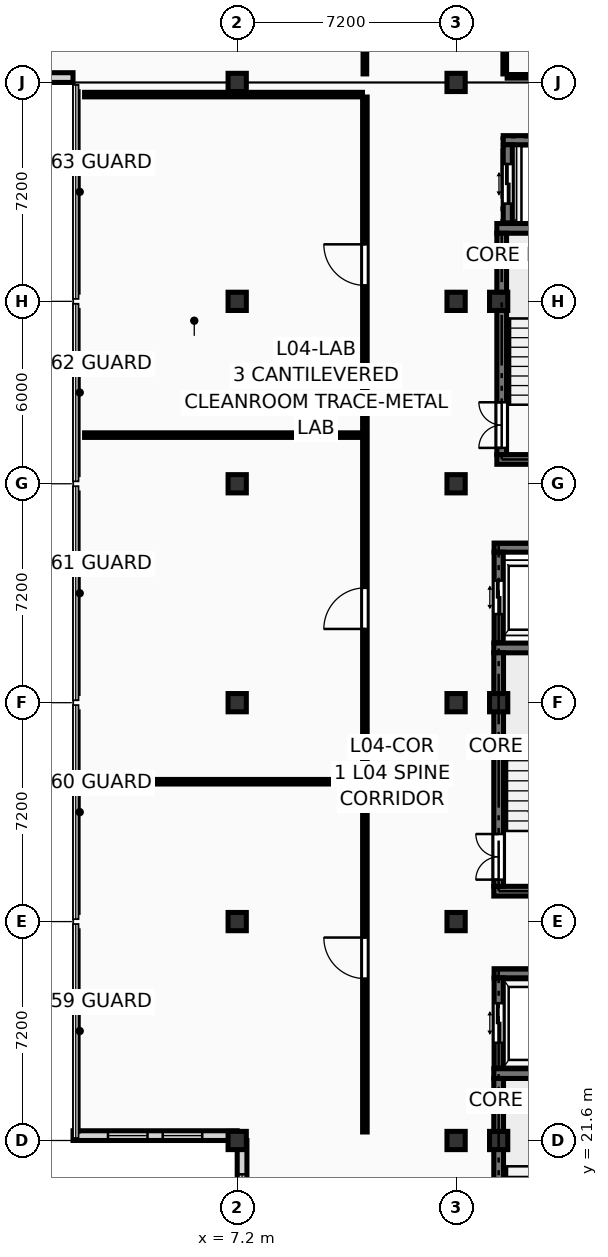
"""IFC4 building model, lengths in metres.
Left out: names, types, materials, properties, quantities, classifications, styles, units other than length and angle.
Written with IfcOpenShell. Run it as: python <this file> out.ifc"""

import sys

from ifc_helpers import new_model, si_unit, direction, frame, frame_2d, origin, origin_2d, place, context, subcontext, project, spatial, rectangle, extrude, element, fill, save


model = new_model("IFC4")
c1 = context("Model", 3, precision=1e-05, world=origin(), true_north=direction((0.0, 1.0)))
c2 = subcontext(c1, "Body", "Model", "MODEL_VIEW")
j1 = project(units=[si_unit("LENGTHUNIT", "METRE"), si_unit("PLANEANGLEUNIT", "RADIAN")], contexts=[c1])
p1 = place(None, origin())
s1 = spatial("IfcSite", under=j1, at=p1, CompositionType="ELEMENT")
p2 = place(p1, origin())
s2 = spatial("IfcBuilding", under=s1, at=p2, CompositionType="ELEMENT")
p3 = place(p2, frame((0.0, 0.0, 15.75)))
s3 = spatial("IfcBuildingStorey", under=s2, at=p3, CompositionType="ELEMENT", Elevation=15.75)
for number, where, z_axis, x_axis in (
    (1, (7.2, 21.6, 0.0), (0.0, 0.0, 1.0), (1.0, 0.0, 0.0)),
    (2, (7.2, 28.8, 0.0), (0.0, 0.0, 1.0), (1.0, 0.0, 0.0)),
    (3, (7.2, 36.0, 0.0), (0.0, 0.0, 1.0), (1.0, 0.0, 0.0)),
    (4, (7.2, 43.2, 0.0), (0.0, 0.0, 1.0), (1.0, 0.0, 0.0)),
    (5, (7.2, 49.2, 0.0), (0.0, 0.0, 1.0), (1.0, 0.0, 0.0)),
    (6, (7.2, 56.4, 0.0), (0.0, 0.0, 1.0), (1.0, 0.0, 0.0)),
    (7, (14.4, 21.6, 0.0), (0.0, 0.0, 1.0), (1.0, 0.0, 0.0)),
    (8, (14.4, 28.8, 0.0), (0.0, 0.0, 1.0), (1.0, 0.0, 0.0)),
    (9, (14.4, 36.0, 0.0), (0.0, 0.0, 1.0), (1.0, 0.0, 0.0)),
    (10, (14.4, 43.2, 0.0), (0.0, 0.0, 1.0), (1.0, 0.0, 0.0)),
    (11, (14.4, 49.2, 0.0), (0.0, 0.0, 1.0), (1.0, 0.0, 0.0)),
    (12, (14.4, 56.4, 0.0), (0.0, 0.0, 1.0), (1.0, 0.0, 0.0)),
    (13, (15.8, 21.6, 0.0), (0.0, 0.0, 1.0), (1.0, 0.0, 0.0)),
    (14, (15.8, 36.0, 0.0), (0.0, 0.0, 1.0), (1.0, 0.0, 0.0)),
    (15, (15.8, 49.2, 0.0), (0.0, 0.0, 1.0), (1.0, 0.0, 0.0)),
):
    element("IfcColumn", number, at=place(p3, frame(where, z_axis=z_axis, x_axis=x_axis)), inside=s3, PredefinedType="COLUMN", context=c2, shape_type="SweptSolid", body=[
        extrude(rectangle(XDim=0.6, YDim=0.6, at=origin_2d()), origin(), (0.0, 0.0, 1.0), 3.6),
    ])
p4 = place(p3, frame((7.36, 14.4, 0.0), z_axis=(0.0, 0.0, 1.0), x_axis=(0.0, 1.0, 0.0)))
e16 = element("IfcWall", 16, at=p4, inside=s3, PredefinedType="SOLIDWALL", context=c2, shape_type="SweptSolid", body=[
    extrude(rectangle(XDim=7.2, YDim=0.32, at=frame_2d((3.6, 0.0))), origin(), (0.0, 0.0, 1.0), 2.84),
])
p5 = place(p4, frame((1.113, 0.0, 0.18)))
e17 = element("IfcOpeningElement", 17, at=p5, cuts=e16, PredefinedType="OPENING", context=c2, shape_type="SweptSolid", body=[
    extrude(rectangle(XDim=1.35, YDim=2.45, at=frame_2d((0.675, 1.225))), frame((0.0, 0.172, 0.0), z_axis=(0.0, -1.0, 0.0), x_axis=(1.0, 0.0, 0.0)), (0.0, 0.0, 1.0), 0.344),
])
p6 = place(p4, frame((2.925, 0.0, 0.18)))
e18 = element("IfcOpeningElement", 18, at=p6, cuts=e16, PredefinedType="OPENING", context=c2, shape_type="SweptSolid", body=[
    extrude(rectangle(XDim=1.35, YDim=2.45, at=frame_2d((0.675, 1.225))), frame((0.0, 0.172, 0.0), z_axis=(0.0, -1.0, 0.0), x_axis=(1.0, 0.0, 0.0)), (0.0, 0.0, 1.0), 0.344),
])
p7 = place(p4, frame((4.738, 0.0, 0.18)))
e19 = element("IfcOpeningElement", 19, at=p7, cuts=e16, PredefinedType="OPENING", context=c2, shape_type="SweptSolid", body=[
    extrude(rectangle(XDim=1.35, YDim=2.45, at=frame_2d((0.675, 1.225))), frame((0.0, 0.172, 0.0), z_axis=(0.0, -1.0, 0.0), x_axis=(1.0, 0.0, 0.0)), (0.0, 0.0, 1.0), 0.344),
])
p8 = place(p3, frame((1.8, 21.76, 0.0), z_axis=(0.0, 0.0, 1.0), x_axis=(1.0, 0.0, 0.0)))
e20 = element("IfcWall", 20, at=p8, inside=s3, PredefinedType="SOLIDWALL", context=c2, shape_type="SweptSolid", body=[
    extrude(rectangle(XDim=5.4, YDim=0.32, at=frame_2d((2.7, 0.0))), origin(), (0.0, 0.0, 1.0), 2.696),
])
p9 = place(p8, frame((1.15, 0.0, 0.18)))
e21 = element("IfcOpeningElement", 21, at=p9, cuts=e20, PredefinedType="OPENING", context=c2, shape_type="SweptSolid", body=[
    extrude(rectangle(XDim=1.3, YDim=2.35, at=frame_2d((0.65, 1.175))), frame((0.0, 0.172, 0.0), z_axis=(0.0, -1.0, 0.0), x_axis=(1.0, 0.0, 0.0)), (0.0, 0.0, 1.0), 0.344),
])
p10 = place(p8, frame((2.95, 0.0, 0.18)))
e22 = element("IfcOpeningElement", 22, at=p10, cuts=e20, PredefinedType="OPENING", context=c2, shape_type="SweptSolid", body=[
    extrude(rectangle(XDim=1.3, YDim=2.35, at=frame_2d((0.65, 1.175))), frame((0.0, 0.172, 0.0), z_axis=(0.0, -1.0, 0.0), x_axis=(1.0, 0.0, 0.0)), (0.0, 0.0, 1.0), 0.344),
])
p11 = place(p3, frame((0.0, 56.56, 0.0), z_axis=(0.0, 0.0, 1.0), x_axis=(1.0, 0.0, 0.0)))
e23 = element("IfcWall", 23, at=p11, inside=s3, PredefinedType="SOLIDWALL", context=c2, shape_type="SweptSolid", body=[
    extrude(rectangle(XDim=1.8, YDim=0.32, at=frame_2d((0.9, 0.0))), origin(), (0.0, 0.0, 1.0), 3.38),
])
p12 = place(p3, frame((15.64, 23.8, 0.0), z_axis=(0.0, 0.0, 1.0), x_axis=(1.0, 0.0, 0.0)))
e24 = element("IfcWall", 24, at=p12, inside=s3, PredefinedType="SHEAR", context=c2, shape_type="SweptSolid", body=[
    extrude(rectangle(XDim=4.84, YDim=0.32, at=frame_2d((2.42, 0.0))), origin(), (0.0, 0.0, 1.0), 3.39),
])
p13 = place(p3, frame((15.8, 15.96, 0.0), z_axis=(0.0, 0.0, 1.0), x_axis=(0.0, 1.0, 0.0)))
e25 = element("IfcWall", 25, at=p13, inside=s3, PredefinedType="SHEAR", context=c2, shape_type="SweptSolid", body=[
    extrude(rectangle(XDim=7.68, YDim=0.32, at=frame_2d((3.84, 0.0))), origin(), (0.0, 0.0, 1.0), 3.39),
])
p14 = place(p13, frame((0.22, 0.0, 0.0)))
e26 = element("IfcOpeningElement", 26, at=p14, cuts=e25, PredefinedType="OPENING", context=c2, shape_type="SweptSolid", body=[
    extrude(rectangle(XDim=1.5, YDim=2.2, at=frame_2d((0.75, 1.1))), frame((0.0, 0.172, 0.0), z_axis=(0.0, -1.0, 0.0), x_axis=(1.0, 0.0, 0.0)), (0.0, 0.0, 1.0), 0.344),
])
for number, where, z_axis, x_axis in (
    (27, (15.64, 29.8, 0.0), (0.0, 0.0, 1.0), (1.0, 0.0, 0.0)),
    (28, (15.64, 37.8, 0.0), (0.0, 0.0, 1.0), (1.0, 0.0, 0.0)),
):
    element("IfcWall", number, at=place(p3, frame(where, z_axis=z_axis, x_axis=x_axis)), inside=s3, PredefinedType="SHEAR", context=c2, shape_type="SweptSolid", body=[
        extrude(rectangle(XDim=4.84, YDim=0.32, at=frame_2d((2.42, 0.0))), origin(), (0.0, 0.0, 1.0), 3.39),
    ])
p15 = place(p3, frame((15.8, 29.96, 0.0), z_axis=(0.0, 0.0, 1.0), x_axis=(0.0, 1.0, 0.0)))
e29 = element("IfcWall", 29, at=p15, inside=s3, PredefinedType="SHEAR", context=c2, shape_type="SweptSolid", body=[
    extrude(rectangle(XDim=7.68, YDim=0.32, at=frame_2d((3.84, 0.0))), origin(), (0.0, 0.0, 1.0), 3.39),
])
p16 = place(p15, frame((0.22, 0.0, 0.0)))
e30 = element("IfcOpeningElement", 30, at=p16, cuts=e29, PredefinedType="OPENING", context=c2, shape_type="SweptSolid", body=[
    extrude(rectangle(XDim=1.5, YDim=2.2, at=frame_2d((0.75, 1.1))), frame((0.0, 0.172, 0.0), z_axis=(0.0, -1.0, 0.0), x_axis=(1.0, 0.0, 0.0)), (0.0, 0.0, 1.0), 0.344),
])
for number, where, z_axis, x_axis in (
    (31, (15.74, 44.0, 0.0), (0.0, 0.0, 1.0), (1.0, 0.0, 0.0)),
    (32, (15.74, 51.6, 0.0), (0.0, 0.0, 1.0), (1.0, 0.0, 0.0)),
):
    element("IfcWall", number, at=place(p3, frame(where, z_axis=z_axis, x_axis=x_axis)), inside=s3, PredefinedType="SHEAR", context=c2, shape_type="SweptSolid", body=[
        extrude(rectangle(XDim=4.44, YDim=0.32, at=frame_2d((2.22, 0.0))), origin(), (0.0, 0.0, 1.0), 3.39),
    ])
p17 = place(p3, frame((15.9, 44.16, 0.0), z_axis=(0.0, 0.0, 1.0), x_axis=(0.0, 1.0, 0.0)))
e33 = element("IfcWall", 33, at=p17, inside=s3, PredefinedType="SHEAR", context=c2, shape_type="SweptSolid", body=[
    extrude(rectangle(XDim=7.28, YDim=0.32, at=frame_2d((3.64, 0.0))), origin(), (0.0, 0.0, 1.0), 3.39),
])
p18 = place(p17, frame((0.22, 0.0, 0.0)))
e34 = element("IfcOpeningElement", 34, at=p18, cuts=e33, PredefinedType="OPENING", context=c2, shape_type="SweptSolid", body=[
    extrude(rectangle(XDim=1.5, YDim=2.2, at=frame_2d((0.75, 1.1))), frame((0.0, 0.172, 0.0), z_axis=(0.0, -1.0, 0.0), x_axis=(1.0, 0.0, 0.0)), (0.0, 0.0, 1.0), 0.344),
])
p19 = place(p3, frame((15.65, 27.1, 0.0), z_axis=(0.0, 0.0, 1.0), x_axis=(1.0, 0.0, 0.0)))
e35 = element("IfcWall", 35, at=p19, inside=s3, PredefinedType="SHEAR", context=c2, shape_type="SweptSolid", body=[
    extrude(rectangle(XDim=2.56, YDim=0.3, at=frame_2d((1.28, 0.0))), origin(), (0.0, 0.0, 1.0), 3.39),
])
p20 = place(p3, frame((15.8, 23.98, 0.0), z_axis=(0.0, 0.0, 1.0), x_axis=(0.0, 1.0, 0.0)))
e36 = element("IfcWall", 36, at=p20, inside=s3, PredefinedType="SHEAR", context=c2, shape_type="SweptSolid", body=[
    extrude(rectangle(XDim=2.97, YDim=0.3, at=frame_2d((1.485, 0.0))), origin(), (0.0, 0.0, 1.0), 3.39),
])
p21 = place(p20, frame((0.835, 0.0, 0.0)))
e37 = element("IfcOpeningElement", 37, at=p21, cuts=e36, PredefinedType="OPENING", context=c2, shape_type="SweptSolid", body=[
    extrude(rectangle(XDim=1.3, YDim=2.25, at=frame_2d((0.65, 1.125))), frame((0.0, 0.162, 0.0), z_axis=(0.0, -1.0, 0.0), x_axis=(1.0, 0.0, 0.0)), (0.0, 0.0, 1.0), 0.324),
])
p22 = place(p3, frame((15.65, 41.1, 0.0), z_axis=(0.0, 0.0, 1.0), x_axis=(1.0, 0.0, 0.0)))
e38 = element("IfcWall", 38, at=p22, inside=s3, PredefinedType="SHEAR", context=c2, shape_type="SweptSolid", body=[
    extrude(rectangle(XDim=2.56, YDim=0.3, at=frame_2d((1.28, 0.0))), origin(), (0.0, 0.0, 1.0), 3.39),
])
p23 = place(p3, frame((15.8, 37.98, 0.0), z_axis=(0.0, 0.0, 1.0), x_axis=(0.0, 1.0, 0.0)))
e39 = element("IfcWall", 39, at=p23, inside=s3, PredefinedType="SHEAR", context=c2, shape_type="SweptSolid", body=[
    extrude(rectangle(XDim=2.97, YDim=0.3, at=frame_2d((1.485, 0.0))), origin(), (0.0, 0.0, 1.0), 3.39),
])
p24 = place(p23, frame((0.935, 0.0, 0.0)))
e40 = element("IfcOpeningElement", 40, at=p24, cuts=e39, PredefinedType="OPENING", context=c2, shape_type="SweptSolid", body=[
    extrude(rectangle(XDim=1.1, YDim=2.2, at=frame_2d((0.55, 1.1))), frame((0.0, 0.162, 0.0), z_axis=(0.0, -1.0, 0.0), x_axis=(1.0, 0.0, 0.0)), (0.0, 0.0, 1.0), 0.324),
])
p25 = place(p3, frame((15.95, 54.5, 0.0), z_axis=(0.0, 0.0, 1.0), x_axis=(1.0, 0.0, 0.0)))
e41 = element("IfcWall", 41, at=p25, inside=s3, PredefinedType="SHEAR", context=c2, shape_type="SweptSolid", body=[
    extrude(rectangle(XDim=3.0, YDim=0.3, at=frame_2d((1.5, 0.0))), origin(), (0.0, 0.0, 1.0), 3.39),
])
p26 = place(p3, frame((16.1, 51.78, 0.0), z_axis=(0.0, 0.0, 1.0), x_axis=(0.0, 1.0, 0.0)))
e42 = element("IfcWall", 42, at=p26, inside=s3, PredefinedType="SHEAR", context=c2, shape_type="SweptSolid", body=[
    extrude(rectangle(XDim=2.57, YDim=0.3, at=frame_2d((1.285, 0.0))), origin(), (0.0, 0.0, 1.0), 3.39),
])
p27 = place(p26, frame((0.635, 0.0, 0.0)))
e43 = element("IfcOpeningElement", 43, at=p27, cuts=e42, PredefinedType="OPENING", context=c2, shape_type="SweptSolid", body=[
    extrude(rectangle(XDim=1.3, YDim=2.25, at=frame_2d((0.65, 1.125))), frame((0.0, 0.162, 0.0), z_axis=(0.0, -1.0, 0.0), x_axis=(1.0, 0.0, 0.0)), (0.0, 0.0, 1.0), 0.324),
])
p28 = place(p3, frame((11.4, 21.88, 0.0), z_axis=(0.0, 0.0, 1.0), x_axis=(0.0, 1.0, 0.0)))
e44 = element("IfcWall", 44, at=p28, inside=s3, PredefinedType="PARTITIONING", context=c2, shape_type="SweptSolid", body=[
    extrude(rectangle(XDim=11.44, YDim=0.15, at=frame_2d((5.72, 0.0))), origin(), (0.0, 0.0, 1.0), 3.375),
])
p29 = place(p28, frame((5.045, 0.0, 0.0)))
e45 = element("IfcOpeningElement", 45, at=p29, cuts=e44, PredefinedType="OPENING", context=c2, shape_type="SweptSolid", body=[
    extrude(rectangle(XDim=1.35, YDim=2.2, at=frame_2d((0.675, 1.1))), frame((0.0, 0.087, 0.0), z_axis=(0.0, -1.0, 0.0), x_axis=(1.0, 0.0, 0.0)), (0.0, 0.0, 1.0), 0.174),
])
p30 = place(p3, frame((2.18, 33.4, 0.0), z_axis=(0.0, 0.0, 1.0), x_axis=(1.0, 0.0, 0.0)))
e46 = element("IfcWall", 46, at=p30, inside=s3, PredefinedType="PARTITIONING", context=c2, shape_type="SweptSolid", body=[
    extrude(rectangle(XDim=9.14, YDim=0.15, at=frame_2d((4.57, 0.0))), origin(), (0.0, 0.0, 1.0), 3.375),
])
p31 = place(p3, frame((11.4, 33.48, 0.0), z_axis=(0.0, 0.0, 1.0), x_axis=(0.0, 1.0, 0.0)))
e47 = element("IfcWall", 47, at=p31, inside=s3, PredefinedType="PARTITIONING", context=c2, shape_type="SweptSolid", body=[
    extrude(rectangle(XDim=11.24, YDim=0.15, at=frame_2d((5.62, 0.0))), origin(), (0.0, 0.0, 1.0), 3.375),
])
p32 = place(p31, frame((4.945, 0.0, 0.0)))
e48 = element("IfcOpeningElement", 48, at=p32, cuts=e47, PredefinedType="OPENING", context=c2, shape_type="SweptSolid", body=[
    extrude(rectangle(XDim=1.35, YDim=2.2, at=frame_2d((0.675, 1.1))), frame((0.0, 0.087, 0.0), z_axis=(0.0, -1.0, 0.0), x_axis=(1.0, 0.0, 0.0)), (0.0, 0.0, 1.0), 0.174),
])
p33 = place(p3, frame((2.18, 44.8, 0.0), z_axis=(0.0, 0.0, 1.0), x_axis=(1.0, 0.0, 0.0)))
e49 = element("IfcWall", 49, at=p33, inside=s3, PredefinedType="PARTITIONING", context=c2, shape_type="SweptSolid", body=[
    extrude(rectangle(XDim=9.14, YDim=0.15, at=frame_2d((4.57, 0.0))), origin(), (0.0, 0.0, 1.0), 3.375),
])
p34 = place(p3, frame((11.4, 44.88, 0.0), z_axis=(0.0, 0.0, 1.0), x_axis=(0.0, 1.0, 0.0)))
e50 = element("IfcWall", 50, at=p34, inside=s3, PredefinedType="PARTITIONING", context=c2, shape_type="SweptSolid", body=[
    extrude(rectangle(XDim=11.04, YDim=0.15, at=frame_2d((5.52, 0.0))), origin(), (0.0, 0.0, 1.0), 3.375),
])
p35 = place(p34, frame((4.845, 0.0, 0.0)))
e51 = element("IfcOpeningElement", 51, at=p35, cuts=e50, PredefinedType="OPENING", context=c2, shape_type="SweptSolid", body=[
    extrude(rectangle(XDim=1.35, YDim=2.2, at=frame_2d((0.675, 1.1))), frame((0.0, 0.087, 0.0), z_axis=(0.0, -1.0, 0.0), x_axis=(1.0, 0.0, 0.0)), (0.0, 0.0, 1.0), 0.174),
])
p36 = place(p3, frame((2.18, 56.0, 0.0), z_axis=(0.0, 0.0, 1.0), x_axis=(1.0, 0.0, 0.0)))
e52 = element("IfcWall", 52, at=p36, inside=s3, PredefinedType="PARTITIONING", context=c2, shape_type="SweptSolid", body=[
    extrude(rectangle(XDim=9.14, YDim=0.15, at=frame_2d((4.57, 0.0))), origin(), (0.0, 0.0, 1.0), 3.375),
])
p37 = place(p3, frame((11.4, 56.68, 0.0), z_axis=(0.0, 0.0, 1.0), x_axis=(0.0, 1.0, 0.0)))
e53 = element("IfcWall", 53, at=p37, inside=s3, PredefinedType="PARTITIONING", context=c2, shape_type="SweptSolid", body=[
    extrude(rectangle(XDim=28.44, YDim=0.12, at=frame_2d((14.22, 0.0))), origin(), (0.0, 0.0, 1.0), 3.375),
])
p38 = place(p37, frame((13.37, 0.0, 0.0)))
e54 = element("IfcOpeningElement", 54, at=p38, cuts=e53, PredefinedType="OPENING", context=c2, shape_type="SweptSolid", body=[
    extrude(rectangle(XDim=1.7, YDim=2.28, at=frame_2d((0.85, 1.14))), frame((0.0, 0.072, 0.0), z_axis=(0.0, -1.0, 0.0), x_axis=(1.0, 0.0, 0.0)), (0.0, 0.0, 1.0), 0.144),
])
p39 = place(p3, frame((16.0, 56.68, 0.0), z_axis=(0.0, 0.0, 1.0), x_axis=(0.0, 1.0, 0.0)))
e55 = element("IfcWall", 55, at=p39, inside=s3, PredefinedType="PARTITIONING", context=c2, shape_type="SweptSolid", body=[
    extrude(rectangle(XDim=15.12, YDim=0.12, at=frame_2d((7.56, 0.0))), origin(), (0.0, 0.0, 1.0), 3.375),
])
p40 = place(p39, frame((8.57, 0.0, 0.0)))
e56 = element("IfcOpeningElement", 56, at=p40, cuts=e55, PredefinedType="OPENING", context=c2, shape_type="SweptSolid", body=[
    extrude(rectangle(XDim=1.32, YDim=2.2, at=frame_2d((0.66, 1.1))), frame((0.0, 0.072, 0.0), z_axis=(0.0, -1.0, 0.0), x_axis=(1.0, 0.0, 0.0)), (0.0, 0.0, 1.0), 0.144),
])
p41 = place(p3, frame((16.08, 56.6, 0.0), z_axis=(0.0, 0.0, 1.0), x_axis=(1.0, 0.0, 0.0)))
e57 = element("IfcWall", 57, at=p41, inside=s3, PredefinedType="PARTITIONING", context=c2, shape_type="SweptSolid", body=[
    extrude(rectangle(XDim=5.04, YDim=0.12, at=frame_2d((2.52, 0.0))), origin(), (0.0, 0.0, 1.0), 2.691),
])
p42 = place(p7, origin())
e58 = element("IfcWindow", 58, at=p42, inside=s3, PartitioningType="SINGLE_PANEL", PredefinedType="WINDOW", context=c2, shape_type="SweptSolid", body=[
    extrude(rectangle(XDim=1.35, YDim=2.45, at=frame_2d((0.675, 1.225))), frame((0.0, 0.03, 0.0), z_axis=(0.0, -1.0, 0.0), x_axis=(1.0, 0.0, 0.0)), (0.0, 0.0, 1.0), 0.06),
])
fill(e19, e58)
p43 = place(p9, origin())
e59 = element("IfcWindow", 59, at=p43, inside=s3, PartitioningType="SINGLE_PANEL", PredefinedType="WINDOW", context=c2, shape_type="SweptSolid", body=[
    extrude(rectangle(XDim=1.3, YDim=2.35, at=frame_2d((0.65, 1.175))), frame((0.0, 0.03, 0.0), z_axis=(0.0, -1.0, 0.0), x_axis=(1.0, 0.0, 0.0)), (0.0, 0.0, 1.0), 0.06),
])
fill(e21, e59)
p44 = place(p10, origin())
e60 = element("IfcWindow", 60, at=p44, inside=s3, PartitioningType="SINGLE_PANEL", PredefinedType="WINDOW", context=c2, shape_type="SweptSolid", body=[
    extrude(rectangle(XDim=1.3, YDim=2.35, at=frame_2d((0.65, 1.175))), frame((0.0, 0.03, 0.0), z_axis=(0.0, -1.0, 0.0), x_axis=(1.0, 0.0, 0.0)), (0.0, 0.0, 1.0), 0.06),
])
fill(e22, e60)
p45 = place(p16, origin())
e61 = element("IfcDoor", 61, at=p45, inside=s3, OperationType="DOUBLE_DOOR_SINGLE_SWING", PredefinedType="DOOR", context=c2, shape_type="SweptSolid", body=[
    extrude(rectangle(XDim=1.5, YDim=2.2, at=frame_2d((0.75, 1.1))), frame((0.0, 0.025, 0.0), z_axis=(0.0, -1.0, 0.0), x_axis=(1.0, 0.0, 0.0)), (0.0, 0.0, 1.0), 0.05),
])
fill(e30, e61)
p46 = place(p18, origin())
e62 = element("IfcDoor", 62, at=p46, inside=s3, OperationType="DOUBLE_DOOR_SINGLE_SWING", PredefinedType="DOOR", context=c2, shape_type="SweptSolid", body=[
    extrude(rectangle(XDim=1.5, YDim=2.2, at=frame_2d((0.75, 1.1))), frame((0.0, 0.025, 0.0), z_axis=(0.0, -1.0, 0.0), x_axis=(1.0, 0.0, 0.0)), (0.0, 0.0, 1.0), 0.05),
])
fill(e34, e62)
p47 = place(p21, origin())
e63 = element("IfcDoor", 63, at=p47, inside=s3, OperationType="DOUBLE_DOOR_SLIDING", PredefinedType="DOOR", context=c2, shape_type="SweptSolid", body=[
    extrude(rectangle(XDim=1.3, YDim=2.25, at=frame_2d((0.65, 1.125))), frame((0.0, 0.025, 0.0), z_axis=(0.0, -1.0, 0.0), x_axis=(1.0, 0.0, 0.0)), (0.0, 0.0, 1.0), 0.05),
])
fill(e37, e63)
p48 = place(p24, origin())
e64 = element("IfcDoor", 64, at=p48, inside=s3, OperationType="DOUBLE_DOOR_SLIDING", PredefinedType="DOOR", context=c2, shape_type="SweptSolid", body=[
    extrude(rectangle(XDim=1.1, YDim=2.2, at=frame_2d((0.55, 1.1))), frame((0.0, 0.025, 0.0), z_axis=(0.0, -1.0, 0.0), x_axis=(1.0, 0.0, 0.0)), (0.0, 0.0, 1.0), 0.05),
])
fill(e40, e64)
p49 = place(p27, origin())
e65 = element("IfcDoor", 65, at=p49, inside=s3, OperationType="DOUBLE_DOOR_SLIDING", PredefinedType="DOOR", context=c2, shape_type="SweptSolid", body=[
    extrude(rectangle(XDim=1.3, YDim=2.25, at=frame_2d((0.65, 1.125))), frame((0.0, 0.025, 0.0), z_axis=(0.0, -1.0, 0.0), x_axis=(1.0, 0.0, 0.0)), (0.0, 0.0, 1.0), 0.05),
])
fill(e43, e65)
p50 = place(p29, origin())
e66 = element("IfcDoor", 66, at=p50, inside=s3, OperationType="SINGLE_SWING_RIGHT", PredefinedType="DOOR", context=c2, shape_type="SweptSolid", body=[
    extrude(rectangle(XDim=1.35, YDim=2.2, at=frame_2d((0.675, 1.1))), frame((0.0, 0.025, 0.0), z_axis=(0.0, -1.0, 0.0), x_axis=(1.0, 0.0, 0.0)), (0.0, 0.0, 1.0), 0.05),
])
fill(e45, e66)
p51 = place(p32, origin())
e67 = element("IfcDoor", 67, at=p51, inside=s3, OperationType="SINGLE_SWING_LEFT", PredefinedType="DOOR", context=c2, shape_type="SweptSolid", body=[
    extrude(rectangle(XDim=1.35, YDim=2.2, at=frame_2d((0.675, 1.1))), frame((0.0, 0.025, 0.0), z_axis=(0.0, -1.0, 0.0), x_axis=(1.0, 0.0, 0.0)), (0.0, 0.0, 1.0), 0.05),
])
fill(e48, e67)
p52 = place(p35, origin())
e68 = element("IfcDoor", 68, at=p52, inside=s3, OperationType="SINGLE_SWING_RIGHT", PredefinedType="DOOR", context=c2, shape_type="SweptSolid", body=[
    extrude(rectangle(XDim=1.35, YDim=2.2, at=frame_2d((0.675, 1.1))), frame((0.0, 0.025, 0.0), z_axis=(0.0, -1.0, 0.0), x_axis=(1.0, 0.0, 0.0)), (0.0, 0.0, 1.0), 0.05),
])
fill(e51, e68)
save(model, sys.argv[1])
